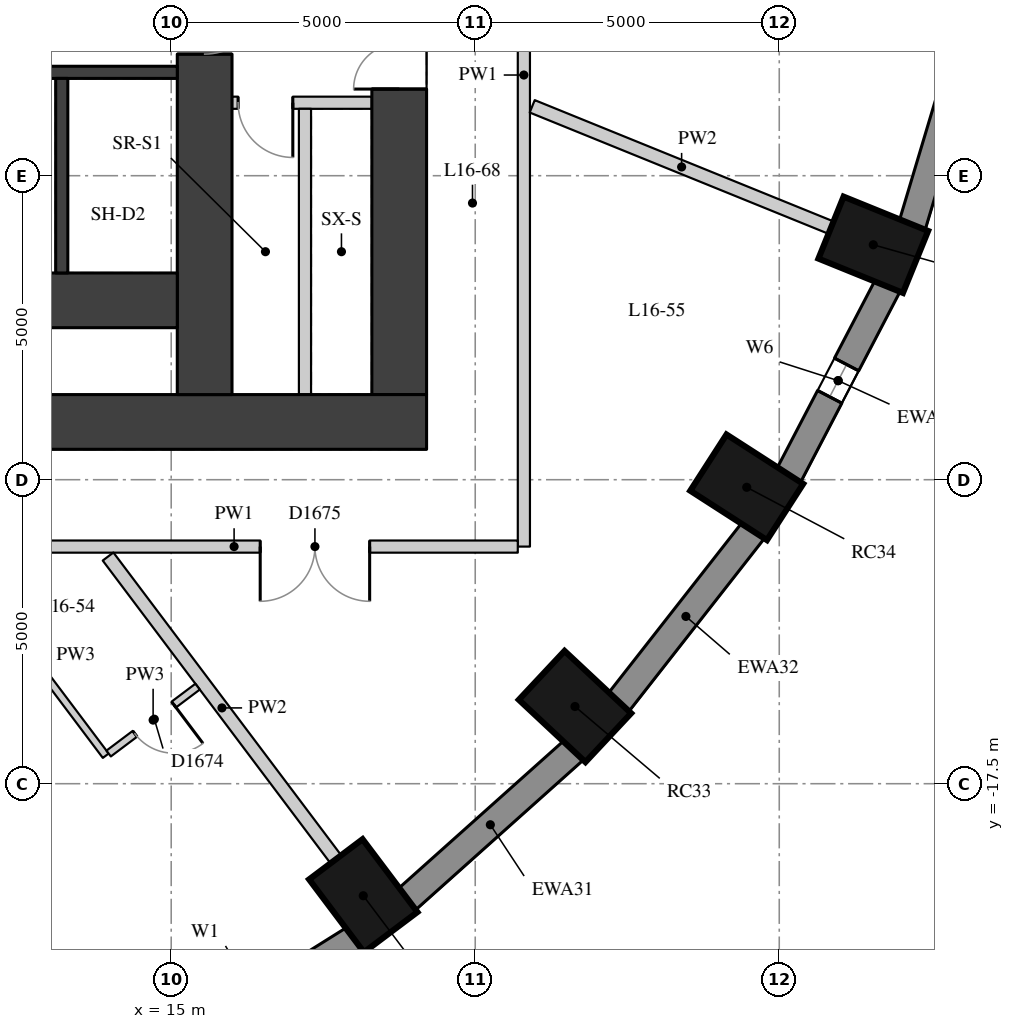
"""IFC4 building model, lengths in metres.
Left out: names, types, materials, properties, quantities, classifications, styles, units other than length and angle.
Written with IfcOpenShell. Run it as: python <this file> out.ifc"""

import sys

from ifc_helpers import new_model, si_unit, direction, frame, frame_2d, origin, origin_2d, place, context, subcontext, project, spatial, rectangle, extrude, element, fill, save


model = new_model("IFC4")
c1 = context("Model", 3, precision=1e-05, world=origin(), true_north=direction((0.0, 1.0)))
c2 = subcontext(c1, "Body", "Model", "MODEL_VIEW")
j1 = project(units=[si_unit("LENGTHUNIT", "METRE"), si_unit("PLANEANGLEUNIT", "RADIAN")], contexts=[c1])
p1 = place(None, origin())
s1 = spatial("IfcSite", under=j1, at=p1, CompositionType="ELEMENT")
p2 = place(p1, origin())
s2 = spatial("IfcBuilding", under=s1, at=p2, CompositionType="ELEMENT")
p3 = place(p2, frame((0.0, 0.0, 61.3)))
s3 = spatial("IfcBuildingStorey", under=s2, at=p3, CompositionType="ELEMENT", Elevation=61.3)
for number, where, z_axis, x_axis in (
    (1, (18.159, -19.343, 0.0), (0.0, 0.0, 1.0), (0.601, -0.799, 0.0)),
    (2, (21.641, -16.23, 0.0), (0.0, 0.0, 1.0), (0.73, -0.683, 0.0)),
    (3, (24.465, -12.625, 0.0), (0.0, 0.0, 1.0), (0.841, -0.541, 0.0)),
    (4, (26.546, -8.636, 0.0), (0.0, 0.0, 1.0), (0.927, -0.376, 0.0)),
):
    element("IfcColumn", number, at=place(p3, frame(where, z_axis=z_axis, x_axis=x_axis)), inside=s3, PredefinedType="COLUMN", context=c2, shape_type="SweptSolid", body=[
        extrude(rectangle(XDim=1.5, YDim=1.1, at=origin_2d()), origin(), (0.0, 0.0, 1.0), 3.3),
    ])
p4 = place(p3, frame((14.817, -22.051, 0.0), z_axis=(0.0, 0.0, 1.0), x_axis=(0.847635480093, 0.530579016629, 0.0)))
e5 = element("IfcWall", 5, at=p4, inside=s3, PredefinedType="SOLIDWALL", context=c2, shape_type="SweptSolid", body=[
    extrude(rectangle(XDim=3.782, YDim=0.45, at=frame_2d((1.891, 0.0))), origin(), (0.0, 0.0, 1.0), 3.02),
])
p5 = place(p4, frame((0.791, 0.0, 0.4)))
e6 = element("IfcOpeningElement", 6, at=p5, cuts=e5, PredefinedType="OPENING", context=c2, shape_type="SweptSolid", body=[
    extrude(rectangle(XDim=2.2, YDim=1.75, at=frame_2d((1.1, 0.875))), frame((0.0, 0.235, 0.0), z_axis=(0.0, -1.0, 0.0), x_axis=(1.0, 0.0, 0.0)), (0.0, 0.0, 1.0), 0.47),
])
p6 = place(p3, frame((18.871, -19.407, 0.0), z_axis=(0.0, 0.0, 1.0), x_axis=(0.745526233716, 0.66647628228, 0.0)))
e7 = element("IfcWall", 7, at=p6, inside=s3, PredefinedType="SOLIDWALL", context=c2, shape_type="SweptSolid", body=[
    extrude(rectangle(XDim=3.697, YDim=0.45, at=frame_2d((1.848, 0.0))), origin(), (0.0, 0.0, 1.0), 3.02),
])
p7 = place(p3, frame((22.352, -16.17, 0.0), z_axis=(0.0, 0.0, 1.0), x_axis=(0.616661975264, 0.787228053529, 0.0)))
e8 = element("IfcWall", 8, at=p7, inside=s3, PredefinedType="SOLIDWALL", context=c2, shape_type="SweptSolid", body=[
    extrude(rectangle(XDim=3.61, YDim=0.45, at=frame_2d((1.805, 0.0))), origin(), (0.0, 0.0, 1.0), 3.02),
])
p8 = place(p3, frame((25.152, -12.437, 0.0), z_axis=(0.0, 0.0, 1.0), x_axis=(0.462492775226, 0.886623050041, 0.0)))
e9 = element("IfcWall", 9, at=p8, inside=s3, PredefinedType="SOLIDWALL", context=c2, shape_type="SweptSolid", body=[
    extrude(rectangle(XDim=3.532, YDim=0.45, at=frame_2d((1.766, 0.0))), origin(), (0.0, 0.0, 1.0), 3.02),
])
p9 = place(p8, frame((1.466, 0.0, 0.4)))
e10 = element("IfcOpeningElement", 10, at=p9, cuts=e9, PredefinedType="OPENING", context=c2, shape_type="SweptSolid", body=[
    extrude(rectangle(XDim=0.6, YDim=1.75, at=frame_2d((0.3, 0.875))), frame((0.0, 0.235, 0.0), z_axis=(0.0, -1.0, 0.0), x_axis=(1.0, 0.0, 0.0)), (0.0, 0.0, 1.0), 0.47),
])
p10 = place(p3, frame((27.185, -8.323, 0.0), z_axis=(0.0, 0.0, 1.0), x_axis=(0.287064133733, 0.957911364963, 0.0)))
e11 = element("IfcWall", 11, at=p10, inside=s3, PredefinedType="SOLIDWALL", context=c2, shape_type="SweptSolid", body=[
    extrude(rectangle(XDim=3.473, YDim=0.45, at=frame_2d((1.737, 0.0))), origin(), (0.0, 0.0, 1.0), 3.02),
])
p11 = place(p3, frame((18.75, -11.1, 0.0), z_axis=(0.0, 0.0, 1.0), x_axis=(0.0, 1.0, 0.0)))
e12 = element("IfcWall", 12, at=p11, inside=s3, PredefinedType="SHEAR", context=c2, shape_type="SweptSolid", body=[
    extrude(rectangle(XDim=22.2, YDim=0.9, at=frame_2d((11.1, 0.0))), origin(), (0.0, 0.0, 1.0), 3.02),
])
p12 = place(p11, frame((16.175, 0.0, 0.0)))
e13 = element("IfcOpeningElement", 13, at=p12, cuts=e12, PredefinedType="OPENING", context=c2, shape_type="SweptSolid", body=[
    extrude(rectangle(XDim=1.5, YDim=2.1, at=frame_2d((0.75, 1.05))), frame((0.0, 0.46, 0.0), z_axis=(0.0, -1.0, 0.0), x_axis=(1.0, 0.0, 0.0)), (0.0, 0.0, 1.0), 0.92),
])
p13 = place(p11, frame((5.025, 0.0, 0.0)))
e14 = element("IfcOpeningElement", 14, at=p13, cuts=e12, PredefinedType="OPENING", context=c2, shape_type="SweptSolid", body=[
    extrude(rectangle(XDim=1.5, YDim=2.1, at=frame_2d((0.75, 1.05))), frame((0.0, 0.46, 0.0), z_axis=(0.0, -1.0, 0.0), x_axis=(1.0, 0.0, 0.0)), (0.0, 0.0, 1.0), 0.92),
])
p14 = place(p3, frame((4.0, -11.55, 0.0), z_axis=(0.0, 0.0, 1.0), x_axis=(1.0, 0.0, 0.0)))
e15 = element("IfcWall", 15, at=p14, inside=s3, PredefinedType="SHEAR", context=c2, shape_type="SweptSolid", body=[
    extrude(rectangle(XDim=15.2, YDim=0.9, at=frame_2d((7.6, 0.0))), origin(), (0.0, 0.0, 1.0), 3.02),
])
p15 = place(p3, frame((15.55, -11.1, 0.0), z_axis=(0.0, 0.0, 1.0), x_axis=(0.0, 1.0, 0.0)))
e16 = element("IfcWall", 16, at=p15, inside=s3, PredefinedType="SHEAR", context=c2, shape_type="SweptSolid", body=[
    extrude(rectangle(XDim=22.2, YDim=0.9, at=frame_2d((11.1, 0.0))), origin(), (0.0, 0.0, 1.0), 3.02),
])
p16 = place(p15, frame((15.6, 0.0, 0.0)))
e17 = element("IfcOpeningElement", 17, at=p16, cuts=e16, PredefinedType="OPENING", context=c2, shape_type="SweptSolid", body=[
    extrude(rectangle(XDim=1.0, YDim=2.1, at=frame_2d((0.5, 1.05))), frame((0.0, 0.46, 0.0), z_axis=(0.0, -1.0, 0.0), x_axis=(1.0, 0.0, 0.0)), (0.0, 0.0, 1.0), 0.92),
])
p17 = place(p15, frame((5.6, 0.0, 0.0)))
e18 = element("IfcOpeningElement", 18, at=p17, cuts=e16, PredefinedType="OPENING", context=c2, shape_type="SweptSolid", body=[
    extrude(rectangle(XDim=1.0, YDim=2.1, at=frame_2d((0.5, 1.05))), frame((0.0, 0.46, 0.0), z_axis=(0.0, -1.0, 0.0), x_axis=(1.0, 0.0, 0.0)), (0.0, 0.0, 1.0), 0.92),
])
p18 = place(p3, frame((4.9, -9.55, 0.0), z_axis=(0.0, 0.0, 1.0), x_axis=(1.0, 0.0, 0.0)))
e19 = element("IfcWall", 19, at=p18, inside=s3, PredefinedType="SHEAR", context=c2, shape_type="SweptSolid", body=[
    extrude(rectangle(XDim=10.2, YDim=0.9, at=frame_2d((5.1, 0.0))), origin(), (0.0, 0.0, 1.0), 3.02),
])
p19 = place(p3, frame((4.9, -5.8, 0.0), z_axis=(0.0, 0.0, 1.0), x_axis=(1.0, 0.0, 0.0)))
e20 = element("IfcWall", 20, at=p19, inside=s3, PredefinedType="SHEAR", context=c2, shape_type="SweptSolid", body=[
    extrude(rectangle(XDim=10.2, YDim=0.2, at=frame_2d((5.1, 0.0))), origin(), (0.0, 0.0, 1.0), 3.02),
])
p20 = place(p3, frame((13.2, -9.1, 0.0), z_axis=(0.0, 0.0, 1.0), x_axis=(0.0, 1.0, 0.0)))
e21 = element("IfcWall", 21, at=p20, inside=s3, PredefinedType="SHEAR", context=c2, shape_type="SweptSolid", body=[
    extrude(rectangle(XDim=3.2, YDim=0.2, at=frame_2d((1.6, 0.0))), origin(), (0.0, 0.0, 1.0), 3.02),
])
p21 = place(p3, frame((16.0, -6.3, 0.0), z_axis=(0.0, 0.0, 1.0), x_axis=(1.0, 0.0, 0.0)))
e22 = element("IfcWall", 22, at=p21, inside=s3, PredefinedType="PARTITIONING", context=c2, shape_type="SweptSolid", body=[
    extrude(rectangle(XDim=2.3, YDim=0.2, at=frame_2d((1.15, 0.0))), origin(), (0.0, 0.0, 1.0), 3.02),
])
p22 = place(p21, frame((0.1, 0.0, 0.0)))
e23 = element("IfcOpeningElement", 23, at=p22, cuts=e22, PredefinedType="OPENING", context=c2, shape_type="SweptSolid", body=[
    extrude(rectangle(XDim=0.9, YDim=2.1, at=frame_2d((0.45, 1.05))), frame((0.0, 0.11, 0.0), z_axis=(0.0, -1.0, 0.0), x_axis=(1.0, 0.0, 0.0)), (0.0, 0.0, 1.0), 0.22),
])
p23 = place(p3, frame((17.2, -11.1, 0.0), z_axis=(0.0, 0.0, 1.0), x_axis=(0.0, 1.0, 0.0)))
e24 = element("IfcWall", 24, at=p23, inside=s3, PredefinedType="PARTITIONING", context=c2, shape_type="SweptSolid", body=[
    extrude(rectangle(XDim=4.7, YDim=0.2, at=frame_2d((2.35, 0.0))), origin(), (0.0, 0.0, 1.0), 3.02),
])
p24 = place(p3, frame((20.8, 1.912, 0.0), z_axis=(0.0, 0.0, 1.0), x_axis=(0.0, -1.0, 0.0)))
e25 = element("IfcWall", 25, at=p24, inside=s3, PredefinedType="PARTITIONING", context=c2, shape_type="SweptSolid", body=[
    extrude(rectangle(XDim=15.512, YDim=0.2, at=frame_2d((7.756, 0.0))), origin(), (0.0, 0.0, 1.0), 3.02),
])
p25 = place(p24, frame((3.11, 0.0, 0.0)))
e26 = element("IfcOpeningElement", 26, at=p25, cuts=e25, PredefinedType="OPENING", context=c2, shape_type="SweptSolid", body=[
    extrude(rectangle(XDim=1.8, YDim=2.1, at=frame_2d((0.9, 1.05))), frame((0.0, 0.11, 0.0), z_axis=(0.0, -1.0, 0.0), x_axis=(1.0, 0.0, 0.0)), (0.0, 0.0, 1.0), 0.22),
])
p26 = place(p3, frame((20.7, -13.6, 0.0), z_axis=(0.0, 0.0, 1.0), x_axis=(-1.0, 0.0, 0.0)))
e27 = element("IfcWall", 27, at=p26, inside=s3, PredefinedType="PARTITIONING", context=c2, shape_type="SweptSolid", body=[
    extrude(rectangle(XDim=9.331, YDim=0.2, at=frame_2d((4.666, 0.0))), origin(), (0.0, 0.0, 1.0), 3.02),
])
p27 = place(p26, frame((2.436, 0.0, 0.0)))
e28 = element("IfcOpeningElement", 28, at=p27, cuts=e27, PredefinedType="OPENING", context=c2, shape_type="SweptSolid", body=[
    extrude(rectangle(XDim=1.8, YDim=2.1, at=frame_2d((0.9, 1.05))), frame((0.0, 0.11, 0.0), z_axis=(0.0, -1.0, 0.0), x_axis=(1.0, 0.0, 0.0)), (0.0, 0.0, 1.0), 0.22),
])
p28 = place(p3, frame((17.708, -18.743, 0.0), z_axis=(0.0, 0.0, 1.0), x_axis=(-0.601177883261, 0.799115231164, 0.0)))
e29 = element("IfcWall", 29, at=p28, inside=s3, PredefinedType="PARTITIONING", context=c2, shape_type="SweptSolid", body=[
    extrude(rectangle(XDim=6.231, YDim=0.22, at=frame_2d((3.116, 0.0))), origin(), (0.0, 0.0, 1.0), 3.02),
])
p29 = place(p3, frame((25.851, -8.354, 0.0), z_axis=(0.0, 0.0, 1.0), x_axis=(-0.926546814299, 0.376179479653, 0.0)))
e30 = element("IfcWall", 30, at=p29, inside=s3, PredefinedType="PARTITIONING", context=c2, shape_type="SweptSolid", body=[
    extrude(rectangle(XDim=5.304, YDim=0.22, at=frame_2d((2.652, 0.0))), origin(), (0.0, 0.0, 1.0), 3.02),
])
p30 = place(p3, frame((11.435, -13.732, 0.0), z_axis=(0.0, 0.0, 1.0), x_axis=(0.601141274104, -0.799142771079, 0.0)))
e31 = element("IfcWall", 31, at=p30, inside=s3, PredefinedType="PARTITIONING", context=c2, shape_type="SweptSolid", body=[
    extrude(rectangle(XDim=4.139, YDim=0.12, at=frame_2d((2.07, 0.0))), origin(), (0.0, 0.0, 1.0), 3.02),
])
p31 = place(p3, frame((13.971, -17.004, 0.0), z_axis=(0.0, 0.0, 1.0), x_axis=(0.799231057954, 0.60102388971, 0.0)))
e32 = element("IfcWall", 32, at=p31, inside=s3, PredefinedType="PARTITIONING", context=c2, shape_type="SweptSolid", body=[
    extrude(rectangle(XDim=1.83, YDim=0.12, at=frame_2d((0.915, 0.0))), origin(), (0.0, 0.0, 1.0), 3.02),
])
p32 = place(p31, frame((0.54, 0.0, 0.0)))
e33 = element("IfcOpeningElement", 33, at=p32, cuts=e32, PredefinedType="OPENING", context=c2, shape_type="SweptSolid", body=[
    extrude(rectangle(XDim=0.8, YDim=2.1, at=frame_2d((0.4, 1.05))), frame((0.0, 0.07, 0.0), z_axis=(0.0, -1.0, 0.0), x_axis=(1.0, 0.0, 0.0)), (0.0, 0.0, 1.0), 0.14),
])
p33 = place(p9, origin())
e34 = element("IfcWindow", 34, at=p33, inside=s3, PartitioningType="SINGLE_PANEL", PredefinedType="WINDOW", context=c2, shape_type="SweptSolid", body=[
    extrude(rectangle(XDim=0.6, YDim=1.75, at=frame_2d((0.3, 0.875))), frame((0.0, 0.035, 0.0), z_axis=(0.0, -1.0, 0.0), x_axis=(1.0, 0.0, 0.0)), (0.0, 0.0, 1.0), 0.06),
])
fill(e10, e34)
p34 = place(p13, origin())
e35 = element("IfcDoor", 35, at=p34, inside=s3, OperationType="DOUBLE_DOOR_SINGLE_SWING", PredefinedType="DOOR", context=c2, shape_type="SweptSolid", body=[
    extrude(rectangle(XDim=1.5, YDim=2.1, at=frame_2d((0.75, 1.05))), frame((0.0, 0.025, 0.0), z_axis=(0.0, -1.0, 0.0), x_axis=(1.0, 0.0, 0.0)), (0.0, 0.0, 1.0), 0.05),
])
fill(e14, e35)
p35 = place(p17, origin())
e36 = element("IfcDoor", 36, at=p35, inside=s3, OperationType="SINGLE_SWING_LEFT", PredefinedType="DOOR", context=c2, shape_type="SweptSolid", body=[
    extrude(rectangle(XDim=1.0, YDim=2.1, at=frame_2d((0.5, 1.05))), frame((0.0, 0.025, 0.0), z_axis=(0.0, -1.0, 0.0), x_axis=(1.0, 0.0, 0.0)), (0.0, 0.0, 1.0), 0.05),
])
fill(e18, e36)
p36 = place(p22, origin())
e37 = element("IfcDoor", 37, at=p36, inside=s3, OperationType="SINGLE_SWING_LEFT", PredefinedType="DOOR", context=c2, shape_type="SweptSolid", body=[
    extrude(rectangle(XDim=0.9, YDim=2.1, at=frame_2d((0.45, 1.05))), frame((0.0, 0.025, 0.0), z_axis=(0.0, -1.0, 0.0), x_axis=(1.0, 0.0, 0.0)), (0.0, 0.0, 1.0), 0.05),
])
fill(e23, e37)
p37 = place(p32, origin())
e38 = element("IfcDoor", 38, at=p37, inside=s3, OperationType="SINGLE_SWING_LEFT", PredefinedType="DOOR", context=c2, shape_type="SweptSolid", body=[
    extrude(rectangle(XDim=0.8, YDim=2.1, at=frame_2d((0.4, 1.05))), frame((0.0, 0.025, 0.0), z_axis=(0.0, -1.0, 0.0), x_axis=(1.0, 0.0, 0.0)), (0.0, 0.0, 1.0), 0.05),
])
fill(e33, e38)
p38 = place(p27, origin())
e39 = element("IfcDoor", 39, at=p38, inside=s3, OperationType="DOUBLE_DOOR_SINGLE_SWING", PredefinedType="DOOR", context=c2, shape_type="SweptSolid", body=[
    extrude(rectangle(XDim=1.8, YDim=2.1, at=frame_2d((0.9, 1.05))), frame((0.0, 0.025, 0.0), z_axis=(0.0, -1.0, 0.0), x_axis=(1.0, 0.0, 0.0)), (0.0, 0.0, 1.0), 0.05),
])
fill(e28, e39)
save(model, sys.argv[1])
